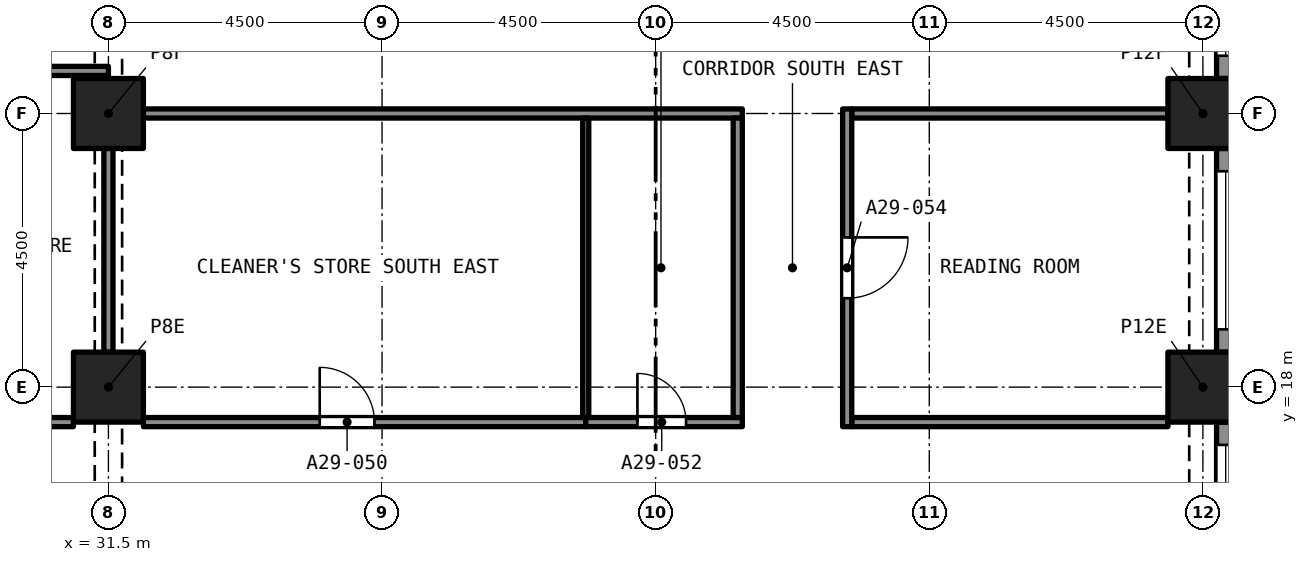
"""IFC4 building model, lengths in metres.
Left out: names, types, materials, properties, quantities, classifications, styles, units other than length and angle.
Written with IfcOpenShell. Run it as: python <this file> out.ifc"""

import sys

from ifc_helpers import new_model, si_unit, direction, frame, frame_2d, origin, origin_2d, place, context, subcontext, project, spatial, rectangle, extrude, element, fill, save


model = new_model("IFC4")
c1 = context("Model", 3, precision=1e-05, world=origin(), true_north=direction((0.0, 1.0)))
c2 = subcontext(c1, "Body", "Model", "MODEL_VIEW")
j1 = project(units=[si_unit("LENGTHUNIT", "METRE"), si_unit("PLANEANGLEUNIT", "RADIAN")], contexts=[c1])
p1 = place(None, origin())
s1 = spatial("IfcSite", under=j1, at=p1, CompositionType="ELEMENT")
p2 = place(p1, origin())
s2 = spatial("IfcBuilding", under=s1, at=p2, CompositionType="ELEMENT")
p3 = place(p2, frame((0.0, 0.0, 105.6)))
s3 = spatial("IfcBuildingStorey", under=s2, at=p3, CompositionType="ELEMENT", Elevation=105.6)
for number, where, z_axis, x_axis in (
    (1, (31.5, 18.0, 0.0), (0.0, 0.0, 1.0), (1.0, 0.0, 0.0)),
    (2, (49.5, 18.0, 0.0), (0.0, 0.0, 1.0), (1.0, 0.0, 0.0)),
    (3, (31.5, 22.5, 0.0), (0.0, 0.0, 1.0), (1.0, 0.0, 0.0)),
    (4, (49.5, 22.5, 0.0), (0.0, 0.0, 1.0), (1.0, 0.0, 0.0)),
):
    element("IfcColumn", number, at=place(p3, frame(where, z_axis=z_axis, x_axis=x_axis)), inside=s3, PredefinedType="COLUMN", context=c2, shape_type="SweptSolid", body=[
        extrude(rectangle(XDim=1.15, YDim=1.15, at=origin_2d()), origin(), (0.0, 0.0, 1.0), 3.2),
    ])
p4 = place(p3, frame((49.875, 17.425, 0.0), z_axis=(0.0, 0.0, 1.0), x_axis=(0.0, -1.0, 0.0)))
e5 = element("IfcWall", 5, at=p4, inside=s3, PredefinedType="SOLIDWALL", context=c2, shape_type="SweptSolid", body=[
    extrude(rectangle(XDim=3.35, YDim=0.3, at=frame_2d((1.675, 0.0))), origin(), (0.0, 0.0, 1.0), 3.2),
])
p5 = place(p4, frame((0.375, 0.0, 0.45)))
e6 = element("IfcOpeningElement", 6, at=p5, cuts=e5, PredefinedType="OPENING", context=c2, shape_type="SweptSolid", body=[
    extrude(rectangle(XDim=2.6, YDim=1.95, at=frame_2d((1.3, 0.975))), frame((0.0, 0.16, 0.0), z_axis=(0.0, -1.0, 0.0), x_axis=(1.0, 0.0, 0.0)), (0.0, 0.0, 1.0), 0.32),
])
p6 = place(p3, frame((49.875, 21.925, 0.0), z_axis=(0.0, 0.0, 1.0), x_axis=(0.0, -1.0, 0.0)))
e7 = element("IfcWall", 7, at=p6, inside=s3, PredefinedType="SOLIDWALL", context=c2, shape_type="SweptSolid", body=[
    extrude(rectangle(XDim=3.35, YDim=0.3, at=frame_2d((1.675, 0.0))), origin(), (0.0, 0.0, 1.0), 3.2),
])
p7 = place(p6, frame((0.375, 0.0, 0.45)))
e8 = element("IfcOpeningElement", 8, at=p7, cuts=e7, PredefinedType="OPENING", context=c2, shape_type="SweptSolid", body=[
    extrude(rectangle(XDim=2.6, YDim=1.95, at=frame_2d((1.3, 0.975))), frame((0.0, 0.16, 0.0), z_axis=(0.0, -1.0, 0.0), x_axis=(1.0, 0.0, 0.0)), (0.0, 0.0, 1.0), 0.32),
])
p8 = place(p3, frame((49.875, 26.425, 0.0), z_axis=(0.0, 0.0, 1.0), x_axis=(0.0, -1.0, 0.0)))
e9 = element("IfcWall", 9, at=p8, inside=s3, PredefinedType="SOLIDWALL", context=c2, shape_type="SweptSolid", body=[
    extrude(rectangle(XDim=3.35, YDim=0.3, at=frame_2d((1.675, 0.0))), origin(), (0.0, 0.0, 1.0), 3.2),
])
p9 = place(p8, frame((0.375, 0.0, 0.45)))
e10 = element("IfcOpeningElement", 10, at=p9, cuts=e9, PredefinedType="OPENING", context=c2, shape_type="SweptSolid", body=[
    extrude(rectangle(XDim=2.6, YDim=1.95, at=frame_2d((1.3, 0.975))), frame((0.0, 0.16, 0.0), z_axis=(0.0, -1.0, 0.0), x_axis=(1.0, 0.0, 0.0)), (0.0, 0.0, 1.0), 0.32),
])
p10 = place(p3, frame((25.725, 17.425, 0.0), z_axis=(0.0, 0.0, 1.0), x_axis=(1.0, 0.0, 0.0)))
e11 = element("IfcWall", 11, at=p10, inside=s3, PredefinedType="PARTITIONING", context=c2, shape_type="SweptSolid", body=[
    extrude(rectangle(XDim=5.2, YDim=0.15, at=frame_2d((2.6, 0.0))), origin(), (0.0, 0.0, 1.0), 2.75),
])
p11 = place(p3, frame((32.075, 17.425, 0.0), z_axis=(0.0, 0.0, 1.0), x_axis=(1.0, 0.0, 0.0)))
e12 = element("IfcWall", 12, at=p11, inside=s3, PredefinedType="PARTITIONING", context=c2, shape_type="SweptSolid", body=[
    extrude(rectangle(XDim=7.275, YDim=0.15, at=frame_2d((3.638, 0.0))), origin(), (0.0, 0.0, 1.0), 2.9),
])
p12 = place(p11, frame((2.9, 0.0, 0.0)))
e13 = element("IfcOpeningElement", 13, at=p12, cuts=e12, PredefinedType="OPENING", context=c2, shape_type="SweptSolid", body=[
    extrude(rectangle(XDim=0.9, YDim=2.1, at=frame_2d((0.45, 1.05))), frame((0.0, 0.085, 0.0), z_axis=(0.0, -1.0, 0.0), x_axis=(1.0, 0.0, 0.0)), (0.0, 0.0, 1.0), 0.17),
])
p13 = place(p3, frame((39.35, 17.425, 0.0), z_axis=(0.0, 0.0, 1.0), x_axis=(1.0, 0.0, 0.0)))
e14 = element("IfcWall", 14, at=p13, inside=s3, PredefinedType="PARTITIONING", context=c2, shape_type="SweptSolid", body=[
    extrude(rectangle(XDim=2.575, YDim=0.15, at=frame_2d((1.288, 0.0))), origin(), (0.0, 0.0, 1.0), 2.9),
])
p14 = place(p13, frame((0.85, 0.0, 0.0)))
e15 = element("IfcOpeningElement", 15, at=p14, cuts=e14, PredefinedType="OPENING", context=c2, shape_type="SweptSolid", body=[
    extrude(rectangle(XDim=0.8, YDim=2.1, at=frame_2d((0.4, 1.05))), frame((0.0, 0.085, 0.0), z_axis=(0.0, -1.0, 0.0), x_axis=(1.0, 0.0, 0.0)), (0.0, 0.0, 1.0), 0.17),
])
p15 = place(p3, frame((43.725, 17.425, 0.0), z_axis=(0.0, 0.0, 1.0), x_axis=(1.0, 0.0, 0.0)))
e16 = element("IfcWall", 16, at=p15, inside=s3, PredefinedType="PARTITIONING", context=c2, shape_type="SweptSolid", body=[
    extrude(rectangle(XDim=5.2, YDim=0.15, at=frame_2d((2.6, 0.0))), origin(), (0.0, 0.0, 1.0), 2.9),
])
p16 = place(p3, frame((25.725, 23.2, 0.0), z_axis=(0.0, 0.0, 1.0), x_axis=(1.0, 0.0, 0.0)))
e17 = element("IfcWall", 17, at=p16, inside=s3, PredefinedType="PARTITIONING", context=c2, shape_type="SweptSolid", body=[
    extrude(rectangle(XDim=5.775, YDim=0.15, at=frame_2d((2.887, 0.0))), origin(), (0.0, 0.0, 1.0), 2.75),
])
p17 = place(p3, frame((31.5, 18.575, 0.0), z_axis=(0.0, 0.0, 1.0), x_axis=(0.0, 1.0, 0.0)))
e18 = element("IfcWall", 18, at=p17, inside=s3, PredefinedType="PARTITIONING", context=c2, shape_type="SweptSolid", body=[
    extrude(rectangle(XDim=3.35, YDim=0.15, at=frame_2d((1.675, 0.0))), origin(), (0.0, 0.0, 1.0), 2.38),
])
p18 = place(p3, frame((32.075, 22.5, 0.0), z_axis=(0.0, 0.0, 1.0), x_axis=(1.0, 0.0, 0.0)))
e19 = element("IfcWall", 19, at=p18, inside=s3, PredefinedType="PARTITIONING", context=c2, shape_type="SweptSolid", body=[
    extrude(rectangle(XDim=9.85, YDim=0.15, at=frame_2d((4.925, 0.0))), origin(), (0.0, 0.0, 1.0), 2.9),
])
p19 = place(p3, frame((43.725, 22.5, 0.0), z_axis=(0.0, 0.0, 1.0), x_axis=(1.0, 0.0, 0.0)))
e20 = element("IfcWall", 20, at=p19, inside=s3, PredefinedType="PARTITIONING", context=c2, shape_type="SweptSolid", body=[
    extrude(rectangle(XDim=5.2, YDim=0.15, at=frame_2d((2.6, 0.0))), origin(), (0.0, 0.0, 1.0), 2.9),
])
p20 = place(p3, frame((41.85, 17.5, 0.0), z_axis=(0.0, 0.0, 1.0), x_axis=(0.0, 1.0, 0.0)))
e21 = element("IfcWall", 21, at=p20, inside=s3, PredefinedType="PARTITIONING", context=c2, shape_type="SweptSolid", body=[
    extrude(rectangle(XDim=4.925, YDim=0.15, at=frame_2d((2.462, 0.0))), origin(), (0.0, 0.0, 1.0), 2.9),
])
p21 = place(p3, frame((43.65, 22.575, 0.0), z_axis=(0.0, 0.0, 1.0), x_axis=(0.0, -1.0, 0.0)))
e22 = element("IfcWall", 22, at=p21, inside=s3, PredefinedType="PARTITIONING", context=c2, shape_type="SweptSolid", body=[
    extrude(rectangle(XDim=5.225, YDim=0.15, at=frame_2d((2.612, 0.0))), origin(), (0.0, 0.0, 1.0), 2.9),
])
p22 = place(p21, frame((2.113, 0.0, 0.0)))
e23 = element("IfcOpeningElement", 23, at=p22, cuts=e22, PredefinedType="OPENING", context=c2, shape_type="SweptSolid", body=[
    extrude(rectangle(XDim=1.0, YDim=2.1, at=frame_2d((0.5, 1.05))), frame((0.0, 0.085, 0.0), z_axis=(0.0, -1.0, 0.0), x_axis=(1.0, 0.0, 0.0)), (0.0, 0.0, 1.0), 0.17),
])
p23 = place(p3, frame((39.35, 17.5, 0.0), z_axis=(0.0, 0.0, 1.0), x_axis=(0.0, 1.0, 0.0)))
e24 = element("IfcWall", 24, at=p23, inside=s3, PredefinedType="PARTITIONING", context=c2, shape_type="SweptSolid", body=[
    extrude(rectangle(XDim=4.925, YDim=0.1, at=frame_2d((2.462, 0.0))), origin(), (0.0, 0.0, 1.0), 2.9),
])
p24 = place(p5, origin())
e25 = element("IfcWindow", 25, at=p24, inside=s3, PartitioningType="SINGLE_PANEL", PredefinedType="WINDOW", context=c2, shape_type="SweptSolid", body=[
    extrude(rectangle(XDim=2.6, YDim=1.95, at=frame_2d((1.3, 0.975))), frame((0.0, 0.03, 0.0), z_axis=(0.0, -1.0, 0.0), x_axis=(1.0, 0.0, 0.0)), (0.0, 0.0, 1.0), 0.06),
])
fill(e6, e25)
p25 = place(p7, origin())
e26 = element("IfcWindow", 26, at=p25, inside=s3, PartitioningType="SINGLE_PANEL", PredefinedType="WINDOW", context=c2, shape_type="SweptSolid", body=[
    extrude(rectangle(XDim=2.6, YDim=1.95, at=frame_2d((1.3, 0.975))), frame((0.0, 0.03, 0.0), z_axis=(0.0, -1.0, 0.0), x_axis=(1.0, 0.0, 0.0)), (0.0, 0.0, 1.0), 0.06),
])
fill(e8, e26)
p26 = place(p9, origin())
e27 = element("IfcWindow", 27, at=p26, inside=s3, PartitioningType="SINGLE_PANEL", PredefinedType="WINDOW", context=c2, shape_type="SweptSolid", body=[
    extrude(rectangle(XDim=2.6, YDim=1.95, at=frame_2d((1.3, 0.975))), frame((0.0, 0.03, 0.0), z_axis=(0.0, -1.0, 0.0), x_axis=(1.0, 0.0, 0.0)), (0.0, 0.0, 1.0), 0.06),
])
fill(e10, e27)
p27 = place(p12, origin())
e28 = element("IfcDoor", 28, at=p27, inside=s3, OperationType="SINGLE_SWING_LEFT", PredefinedType="DOOR", context=c2, shape_type="SweptSolid", body=[
    extrude(rectangle(XDim=0.9, YDim=2.1, at=frame_2d((0.45, 1.05))), frame((0.0, 0.025, 0.0), z_axis=(0.0, -1.0, 0.0), x_axis=(1.0, 0.0, 0.0)), (0.0, 0.0, 1.0), 0.05),
])
fill(e13, e28)
p28 = place(p14, origin())
e29 = element("IfcDoor", 29, at=p28, inside=s3, OperationType="SINGLE_SWING_LEFT", PredefinedType="DOOR", context=c2, shape_type="SweptSolid", body=[
    extrude(rectangle(XDim=0.8, YDim=2.1, at=frame_2d((0.4, 1.05))), frame((0.0, 0.025, 0.0), z_axis=(0.0, -1.0, 0.0), x_axis=(1.0, 0.0, 0.0)), (0.0, 0.0, 1.0), 0.05),
])
fill(e15, e29)
p29 = place(p22, origin())
e30 = element("IfcDoor", 30, at=p29, inside=s3, OperationType="SINGLE_SWING_RIGHT", PredefinedType="DOOR", context=c2, shape_type="SweptSolid", body=[
    extrude(rectangle(XDim=1.0, YDim=2.1, at=frame_2d((0.5, 1.05))), frame((0.0, 0.025, 0.0), z_axis=(0.0, -1.0, 0.0), x_axis=(1.0, 0.0, 0.0)), (0.0, 0.0, 1.0), 0.05),
])
fill(e23, e30)
save(model, sys.argv[1])
